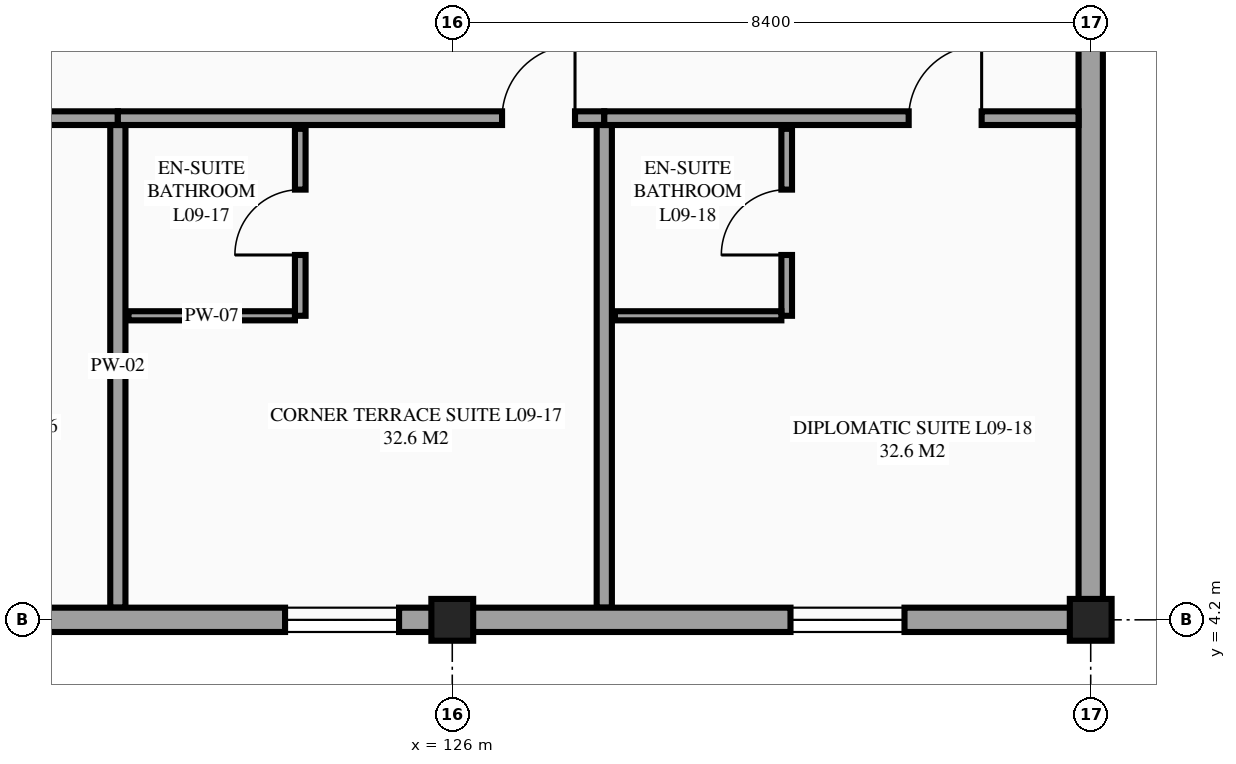
"""IFC4 building model, lengths in metres.
Left out: names, types, materials, properties, quantities, classifications, styles, units other than length and angle.
Written with IfcOpenShell. Run it as: python <this file> out.ifc"""

import sys

from ifc_helpers import new_model, si_unit, direction, frame, frame_2d, origin, origin_2d, place, context, subcontext, project, spatial, rectangle, extrude, element, fill, save


model = new_model("IFC4")
c1 = context("Model", 3, precision=1e-05, world=origin(), true_north=direction((0.0, 1.0)))
c2 = subcontext(c1, "Body", "Model", "MODEL_VIEW")
j1 = project(units=[si_unit("LENGTHUNIT", "METRE"), si_unit("PLANEANGLEUNIT", "RADIAN")], contexts=[c1])
p1 = place(None, origin())
s1 = spatial("IfcSite", under=j1, at=p1, CompositionType="ELEMENT")
p2 = place(p1, origin())
s2 = spatial("IfcBuilding", under=s1, at=p2, CompositionType="ELEMENT")
p3 = place(p2, frame((0.0, 0.0, 36.3)))
s3 = spatial("IfcBuildingStorey", under=s2, at=p3, CompositionType="ELEMENT", Elevation=36.3)
for number, where, z_axis, x_axis in (
    (1, (126.0, 4.2, 0.0), (0.0, 0.0, 1.0), (1.0, 0.0, 0.0)),
    (2, (134.4, 4.2, 0.0), (0.0, 0.0, 1.0), (1.0, 0.0, 0.0)),
):
    element("IfcColumn", number, at=place(p3, frame(where, z_axis=z_axis, x_axis=x_axis)), inside=s3, PredefinedType="COLUMN", context=c2, shape_type="SweptSolid", body=[
        extrude(rectangle(XDim=0.55, YDim=0.55, at=origin_2d()), origin(), (0.0, 0.0, 1.0), 3.6),
    ])
p4 = place(p3, frame((134.4, 4.2, 0.0), z_axis=(0.0, 0.0, 1.0), x_axis=(0.0, 1.0, 0.0)))
e3 = element("IfcWall", 3, at=p4, inside=s3, PredefinedType="STANDARD", context=c2, shape_type="SweptSolid", body=[
    extrude(rectangle(XDim=16.8, YDim=0.32, at=frame_2d((8.4, 0.0))), origin(), (0.0, 0.0, 1.0), 2.53),
])
p5 = place(p3, frame((115.2, 10.8, 0.0), z_axis=(0.0, 0.0, 1.0), x_axis=(1.0, 0.0, 0.0)))
e4 = element("IfcWall", 4, at=p5, inside=s3, PredefinedType="PARTITIONING", context=c2, shape_type="SweptSolid", body=[
    extrude(rectangle(XDim=6.4, YDim=0.18, at=frame_2d((3.2, 0.0))), origin(), (0.0, 0.0, 1.0), 3.375),
])
p6 = place(p5, frame((4.355, 0.0, 0.0)))
e5 = element("IfcOpeningElement", 5, at=p6, cuts=e4, PredefinedType="OPENING", context=c2, shape_type="SweptSolid", body=[
    extrude(rectangle(XDim=0.96, YDim=2.15, at=frame_2d((0.48, 1.075))), frame((0.0, 0.1, 0.0), z_axis=(0.0, -1.0, 0.0), x_axis=(1.0, 0.0, 0.0)), (0.0, 0.0, 1.0), 0.2),
])
p7 = place(p3, frame((121.6, 4.36, 0.0), z_axis=(0.0, 0.0, 1.0), x_axis=(0.0, 1.0, 0.0)))
e6 = element("IfcWall", 6, at=p7, inside=s3, PredefinedType="PARTITIONING", context=c2, shape_type="SweptSolid", body=[
    extrude(rectangle(XDim=6.35, YDim=0.2, at=frame_2d((3.175, 0.0))), origin(), (0.0, 0.0, 1.0), 3.375),
])
p8 = place(p3, frame((121.6, 10.8, 0.0), z_axis=(0.0, 0.0, 1.0), x_axis=(1.0, 0.0, 0.0)))
e7 = element("IfcWall", 7, at=p8, inside=s3, PredefinedType="PARTITIONING", context=c2, shape_type="SweptSolid", body=[
    extrude(rectangle(XDim=6.4, YDim=0.18, at=frame_2d((3.2, 0.0))), origin(), (0.0, 0.0, 1.0), 3.375),
])
p9 = place(p8, frame((5.055, 0.0, 0.0)))
e8 = element("IfcOpeningElement", 8, at=p9, cuts=e7, PredefinedType="OPENING", context=c2, shape_type="SweptSolid", body=[
    extrude(rectangle(XDim=0.96, YDim=2.15, at=frame_2d((0.48, 1.075))), frame((0.0, 0.1, 0.0), z_axis=(0.0, -1.0, 0.0), x_axis=(1.0, 0.0, 0.0)), (0.0, 0.0, 1.0), 0.2),
])
p10 = place(p3, frame((128.0, 4.36, 0.0), z_axis=(0.0, 0.0, 1.0), x_axis=(0.0, 1.0, 0.0)))
e9 = element("IfcWall", 9, at=p10, inside=s3, PredefinedType="PARTITIONING", context=c2, shape_type="SweptSolid", body=[
    extrude(rectangle(XDim=6.35, YDim=0.2, at=frame_2d((3.175, 0.0))), origin(), (0.0, 0.0, 1.0), 3.375),
])
p11 = place(p3, frame((124.0, 8.2, 0.0), z_axis=(0.0, 0.0, 1.0), x_axis=(0.0, 1.0, 0.0)))
e10 = element("IfcWall", 10, at=p11, inside=s3, PredefinedType="PARTITIONING", context=c2, shape_type="SweptSolid", body=[
    extrude(rectangle(XDim=2.46, YDim=0.14, at=frame_2d((1.23, 0.0))), origin(), (0.0, 0.0, 1.0), 3.375),
])
p12 = place(p11, frame((0.8, 0.0, 0.0)))
e11 = element("IfcOpeningElement", 11, at=p12, cuts=e10, PredefinedType="OPENING", context=c2, shape_type="SweptSolid", body=[
    extrude(rectangle(XDim=0.86, YDim=2.1, at=frame_2d((0.43, 1.05))), frame((0.0, 0.08, 0.0), z_axis=(0.0, -1.0, 0.0), x_axis=(1.0, 0.0, 0.0)), (0.0, 0.0, 1.0), 0.16),
])
p13 = place(p3, frame((121.74, 8.2, 0.0), z_axis=(0.0, 0.0, 1.0), x_axis=(1.0, 0.0, 0.0)))
e12 = element("IfcWall", 12, at=p13, inside=s3, PredefinedType="PARTITIONING", context=c2, shape_type="SweptSolid", body=[
    extrude(rectangle(XDim=2.19, YDim=0.12, at=frame_2d((1.095, 0.0))), origin(), (0.0, 0.0, 1.0), 3.375),
])
p14 = place(p3, frame((128.0, 10.8, 0.0), z_axis=(0.0, 0.0, 1.0), x_axis=(1.0, 0.0, 0.0)))
e13 = element("IfcWall", 13, at=p14, inside=s3, PredefinedType="PARTITIONING", context=c2, shape_type="SweptSolid", body=[
    extrude(rectangle(XDim=6.24, YDim=0.18, at=frame_2d((3.12, 0.0))), origin(), (0.0, 0.0, 1.0), 3.375),
])
p15 = place(p14, frame((4.005, 0.0, 0.0)))
e14 = element("IfcOpeningElement", 14, at=p15, cuts=e13, PredefinedType="OPENING", context=c2, shape_type="SweptSolid", body=[
    extrude(rectangle(XDim=0.96, YDim=2.15, at=frame_2d((0.48, 1.075))), frame((0.0, 0.1, 0.0), z_axis=(0.0, -1.0, 0.0), x_axis=(1.0, 0.0, 0.0)), (0.0, 0.0, 1.0), 0.2),
])
p16 = place(p3, frame((130.4, 8.2, 0.0), z_axis=(0.0, 0.0, 1.0), x_axis=(0.0, 1.0, 0.0)))
e15 = element("IfcWall", 15, at=p16, inside=s3, PredefinedType="PARTITIONING", context=c2, shape_type="SweptSolid", body=[
    extrude(rectangle(XDim=2.46, YDim=0.14, at=frame_2d((1.23, 0.0))), origin(), (0.0, 0.0, 1.0), 3.375),
])
p17 = place(p16, frame((0.8, 0.0, 0.0)))
e16 = element("IfcOpeningElement", 16, at=p17, cuts=e15, PredefinedType="OPENING", context=c2, shape_type="SweptSolid", body=[
    extrude(rectangle(XDim=0.86, YDim=2.1, at=frame_2d((0.43, 1.05))), frame((0.0, 0.08, 0.0), z_axis=(0.0, -1.0, 0.0), x_axis=(1.0, 0.0, 0.0)), (0.0, 0.0, 1.0), 0.16),
])
p18 = place(p3, frame((128.14, 8.2, 0.0), z_axis=(0.0, 0.0, 1.0), x_axis=(1.0, 0.0, 0.0)))
e17 = element("IfcWall", 17, at=p18, inside=s3, PredefinedType="PARTITIONING", context=c2, shape_type="SweptSolid", body=[
    extrude(rectangle(XDim=2.19, YDim=0.12, at=frame_2d((1.095, 0.0))), origin(), (0.0, 0.0, 1.0), 3.375),
])
p19 = place(p3, frame((117.6, 4.2, 0.0), z_axis=(0.0, 0.0, 1.0), x_axis=(1.0, 0.0, 0.0)))
e18 = element("IfcWall", 18, at=p19, inside=s3, PredefinedType="STANDARD", context=c2, shape_type="SweptSolid", body=[
    extrude(rectangle(XDim=8.4, YDim=0.32, at=frame_2d((4.2, 0.0))), origin(), (0.0, 0.0, 1.0), 2.88),
])
p20 = place(p19, frame((0.8, 0.0, 0.85)))
e19 = element("IfcOpeningElement", 19, at=p20, cuts=e18, PredefinedType="OPENING", context=c2, shape_type="SweptSolid", body=[
    extrude(rectangle(XDim=1.5, YDim=1.5, at=frame_2d((0.75, 0.75))), frame((0.0, 0.17, 0.0), z_axis=(0.0, -1.0, 0.0), x_axis=(1.0, 0.0, 0.0)), (0.0, 0.0, 1.0), 0.34),
])
p21 = place(p19, frame((6.2, 0.0, 0.85)))
e20 = element("IfcOpeningElement", 20, at=p21, cuts=e18, PredefinedType="OPENING", context=c2, shape_type="SweptSolid", body=[
    extrude(rectangle(XDim=1.5, YDim=1.5, at=frame_2d((0.75, 0.75))), frame((0.0, 0.17, 0.0), z_axis=(0.0, -1.0, 0.0), x_axis=(1.0, 0.0, 0.0)), (0.0, 0.0, 1.0), 0.34),
])
p22 = place(p3, frame((126.0, 4.2, 0.0), z_axis=(0.0, 0.0, 1.0), x_axis=(1.0, 0.0, 0.0)))
e21 = element("IfcWall", 21, at=p22, inside=s3, PredefinedType="STANDARD", context=c2, shape_type="SweptSolid", body=[
    extrude(rectangle(XDim=8.4, YDim=0.32, at=frame_2d((4.2, 0.0))), origin(), (0.0, 0.0, 1.0), 2.63),
])
p23 = place(p22, frame((4.45, 0.0, 0.85)))
e22 = element("IfcOpeningElement", 22, at=p23, cuts=e21, PredefinedType="OPENING", context=c2, shape_type="SweptSolid", body=[
    extrude(rectangle(XDim=1.5, YDim=1.5, at=frame_2d((0.75, 0.75))), frame((0.0, 0.17, 0.0), z_axis=(0.0, -1.0, 0.0), x_axis=(1.0, 0.0, 0.0)), (0.0, 0.0, 1.0), 0.34),
])
p24 = place(p21, origin())
e23 = element("IfcWindow", 23, at=p24, inside=s3, PartitioningType="SINGLE_PANEL", PredefinedType="WINDOW", context=c2, shape_type="SweptSolid", body=[
    extrude(rectangle(XDim=1.5, YDim=1.5, at=frame_2d((0.75, 0.75))), frame((0.0, 0.03, 0.0), z_axis=(0.0, -1.0, 0.0), x_axis=(1.0, 0.0, 0.0)), (0.0, 0.0, 1.0), 0.06),
])
fill(e20, e23)
p25 = place(p23, origin())
e24 = element("IfcWindow", 24, at=p25, inside=s3, PartitioningType="SINGLE_PANEL", PredefinedType="WINDOW", context=c2, shape_type="SweptSolid", body=[
    extrude(rectangle(XDim=1.5, YDim=1.5, at=frame_2d((0.75, 0.75))), frame((0.0, 0.03, 0.0), z_axis=(0.0, -1.0, 0.0), x_axis=(1.0, 0.0, 0.0)), (0.0, 0.0, 1.0), 0.06),
])
fill(e22, e24)
p26 = place(p9, origin())
e25 = element("IfcDoor", 25, at=p26, inside=s3, OperationType="SINGLE_SWING_RIGHT", PredefinedType="DOOR", context=c2, shape_type="SweptSolid", body=[
    extrude(rectangle(XDim=0.96, YDim=2.15, at=frame_2d((0.48, 1.075))), frame((0.0, 0.025, 0.0), z_axis=(0.0, -1.0, 0.0), x_axis=(1.0, 0.0, 0.0)), (0.0, 0.0, 1.0), 0.05),
])
fill(e8, e25)
p27 = place(p12, origin())
e26 = element("IfcDoor", 26, at=p27, inside=s3, OperationType="SINGLE_SWING_LEFT", PredefinedType="DOOR", context=c2, shape_type="SweptSolid", body=[
    extrude(rectangle(XDim=0.86, YDim=2.1, at=frame_2d((0.43, 1.05))), frame((0.0, 0.025, 0.0), z_axis=(0.0, -1.0, 0.0), x_axis=(1.0, 0.0, 0.0)), (0.0, 0.0, 1.0), 0.05),
])
fill(e11, e26)
p28 = place(p15, origin())
e27 = element("IfcDoor", 27, at=p28, inside=s3, OperationType="SINGLE_SWING_RIGHT", PredefinedType="DOOR", context=c2, shape_type="SweptSolid", body=[
    extrude(rectangle(XDim=0.96, YDim=2.15, at=frame_2d((0.48, 1.075))), frame((0.0, 0.025, 0.0), z_axis=(0.0, -1.0, 0.0), x_axis=(1.0, 0.0, 0.0)), (0.0, 0.0, 1.0), 0.05),
])
fill(e14, e27)
p29 = place(p17, origin())
e28 = element("IfcDoor", 28, at=p29, inside=s3, OperationType="SINGLE_SWING_LEFT", PredefinedType="DOOR", context=c2, shape_type="SweptSolid", body=[
    extrude(rectangle(XDim=0.86, YDim=2.1, at=frame_2d((0.43, 1.05))), frame((0.0, 0.025, 0.0), z_axis=(0.0, -1.0, 0.0), x_axis=(1.0, 0.0, 0.0)), (0.0, 0.0, 1.0), 0.05),
])
fill(e16, e28)
save(model, sys.argv[1])
